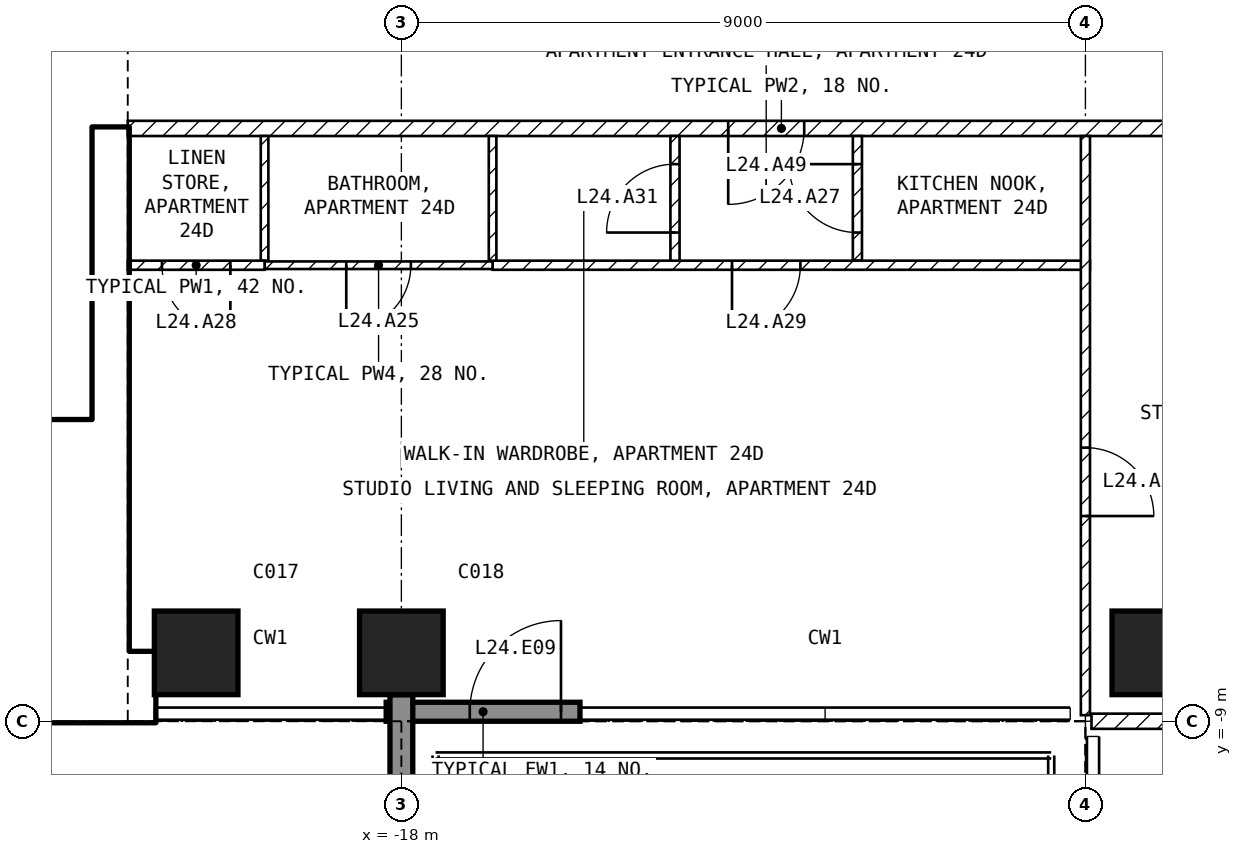
"""IFC4 building model, lengths in metres.
Left out: names, types, materials, properties, quantities, classifications, styles, units other than length and angle.
Written with IfcOpenShell. Run it as: python <this file> out.ifc"""

import sys

from ifc_helpers import new_model, si_unit, direction, frame, frame_2d, origin, origin_2d, place, context, subcontext, project, spatial, rectangle, extrude, element, fill, save


model = new_model("IFC4")
c1 = context("Model", 3, precision=1e-05, world=origin(), true_north=direction((0.0, 1.0)))
c2 = subcontext(c1, "Body", "Model", "MODEL_VIEW")
j1 = project(units=[si_unit("LENGTHUNIT", "METRE"), si_unit("PLANEANGLEUNIT", "RADIAN")], contexts=[c1])
p1 = place(None, origin())
s1 = spatial("IfcSite", under=j1, at=p1, CompositionType="ELEMENT")
p2 = place(p1, origin())
s2 = spatial("IfcBuilding", under=s1, at=p2, CompositionType="ELEMENT")
p3 = place(p2, frame((0.0, 0.0, 105.9)))
s3 = spatial("IfcBuildingStorey", under=s2, at=p3, CompositionType="ELEMENT", Elevation=105.9)
for number, where, z_axis, x_axis in (
    (1, (-20.7, -8.1, -0.25), (0.0, 0.0, 1.0), (1.0, 0.0, 0.0)),
    (2, (-18.0, -8.1, -0.25), (0.0, 0.0, 1.0), (1.0, 0.0, 0.0)),
    (3, (-8.1, -8.1, -0.25), (0.0, 0.0, 1.0), (1.0, 0.0, 0.0)),
):
    element("IfcColumn", number, at=place(p3, frame(where, z_axis=z_axis, x_axis=x_axis)), inside=s3, PredefinedType="COLUMN", context=c2, shape_type="SweptSolid", body=[
        extrude(rectangle(XDim=1.1, YDim=1.1, at=origin_2d()), origin(), (0.0, 0.0, 1.0), 3.5),
    ])
p4 = place(p3, frame((-18.2, -8.875, 0.0), z_axis=(0.0, 0.0, 1.0), x_axis=(1.0, 0.0, 0.0)))
e4 = element("IfcWall", 4, at=p4, inside=s3, PredefinedType="SOLIDWALL", context=c2, shape_type="SweptSolid", body=[
    extrude(rectangle(XDim=2.55, YDim=0.25, at=frame_2d((1.275, 0.0))), origin(), (0.0, 0.0, 1.0), 3.25),
])
p5 = place(p4, frame((1.1, 0.0, 0.0)))
e5 = element("IfcOpeningElement", 5, at=p5, cuts=e4, PredefinedType="OPENING", context=c2, shape_type="SweptSolid", body=[
    extrude(rectangle(XDim=1.2, YDim=2.4, at=frame_2d((0.6, 1.2))), frame((0.0, 0.135, 0.0), z_axis=(0.0, -1.0, 0.0), x_axis=(1.0, 0.0, 0.0)), (0.0, 0.0, 1.0), 0.27),
])
p6 = place(p3, frame((-18.0, -8.65, 0.0), z_axis=(0.0, 0.0, 1.0), x_axis=(0.0, -1.0, 0.0)))
e6 = element("IfcWall", 6, at=p6, inside=s3, PredefinedType="SOLIDWALL", context=c2, shape_type="SweptSolid", body=[
    extrude(rectangle(XDim=3.09, YDim=0.3, at=frame_2d((1.545, 0.0))), origin(), (0.0, 0.0, 1.0), 3.25),
])
p7 = place(p3, frame((-30.2, -8.55, 0.0), z_axis=(0.0, 0.0, 1.0), x_axis=(1.0, 0.0, 0.0)))
e7 = element("IfcWall", 7, at=p7, inside=s3, PredefinedType="SHEAR", context=c2, shape_type="SweptSolid", body=[
    extrude(rectangle(XDim=8.95, YDim=0.9, at=frame_2d((4.475, 0.0))), origin(), (0.0, 0.0, 1.0), 3.25),
])
p8 = place(p3, frame((-21.825, -8.1, 0.0), z_axis=(0.0, 0.0, 1.0), x_axis=(0.0, 1.0, 0.0)))
e8 = element("IfcWall", 8, at=p8, inside=s3, PredefinedType="SHEAR", context=c2, shape_type="SweptSolid", body=[
    extrude(rectangle(XDim=6.9, YDim=0.45, at=frame_2d((3.45, 0.0))), origin(), (0.0, 0.0, 1.0), 3.25),
])
p9 = place(p3, frame((-28.35, -5.15, 0.0), z_axis=(0.0, 0.0, 1.0), x_axis=(1.0, 0.0, 0.0)))
e9 = element("IfcWall", 9, at=p9, inside=s3, PredefinedType="SOLIDWALL", context=c2, shape_type="SweptSolid", body=[
    extrude(rectangle(XDim=6.3, YDim=0.2, at=frame_2d((3.15, 0.0))), origin(), (0.0, 0.0, 1.0), 3.25),
])
p10 = place(p9, frame((5.1, 0.0, 0.0)))
e10 = element("IfcOpeningElement", 10, at=p10, cuts=e9, PredefinedType="OPENING", context=c2, shape_type="SweptSolid", body=[
    extrude(rectangle(XDim=1.0, YDim=2.1, at=frame_2d((0.5, 1.05))), frame((0.0, 0.11, 0.0), z_axis=(0.0, -1.0, 0.0), x_axis=(1.0, 0.0, 0.0)), (0.0, 0.0, 1.0), 0.22),
])
p11 = place(p3, frame((-4.4, -1.2, 0.0), z_axis=(0.0, 0.0, 1.0), x_axis=(-1.0, 0.0, 0.0)))
e11 = element("IfcWall", 11, at=p11, inside=s3, PredefinedType="PARTITIONING", context=c2, shape_type="SweptSolid", body=[
    extrude(rectangle(XDim=17.2, YDim=0.2, at=frame_2d((8.6, 0.0))), origin(), (0.0, 0.0, 1.0), 3.25),
])
p12 = place(p11, frame((8.3, 0.0, 0.0)))
e12 = element("IfcOpeningElement", 12, at=p12, cuts=e11, PredefinedType="OPENING", context=c2, shape_type="SweptSolid", body=[
    extrude(rectangle(XDim=1.0, YDim=2.1, at=frame_2d((0.5, 1.05))), frame((0.0, 0.11, 0.0), z_axis=(0.0, -1.0, 0.0), x_axis=(1.0, 0.0, 0.0)), (0.0, 0.0, 1.0), 0.22),
])
p13 = place(p3, frame((8.92, -9.0, 0.0), z_axis=(0.0, 0.0, 1.0), x_axis=(-1.0, 0.0, 0.0)))
e13 = element("IfcWall", 13, at=p13, inside=s3, PredefinedType="PARTITIONING", context=c2, shape_type="SweptSolid", body=[
    extrude(rectangle(XDim=17.84, YDim=0.2, at=frame_2d((8.92, 0.0))), origin(), (0.0, 0.0, 1.0), 3.25),
])
p14 = place(p13, frame((8.42, 0.0, 0.0)))
e14 = element("IfcOpeningElement", 14, at=p14, cuts=e13, PredefinedType="OPENING", context=c2, shape_type="SweptSolid", body=[
    extrude(rectangle(XDim=1.0, YDim=2.1, at=frame_2d((0.5, 1.05))), frame((0.0, 0.11, 0.0), z_axis=(0.0, -1.0, 0.0), x_axis=(1.0, 0.0, 0.0)), (0.0, 0.0, 1.0), 0.22),
])
p15 = place(p3, frame((-12.0, -2.94, 0.0), z_axis=(0.0, 0.0, 1.0), x_axis=(0.0, 1.0, 0.0)))
e15 = element("IfcWall", 15, at=p15, inside=s3, PredefinedType="PARTITIONING", context=c2, shape_type="SweptSolid", body=[
    extrude(rectangle(XDim=1.64, YDim=0.12, at=frame_2d((0.82, 0.0))), origin(), (0.0, 0.0, 1.0), 3.25),
])
p16 = place(p15, frame((0.37, 0.0, 0.0)))
e16 = element("IfcOpeningElement", 16, at=p16, cuts=e15, PredefinedType="OPENING", context=c2, shape_type="SweptSolid", body=[
    extrude(rectangle(XDim=0.9, YDim=2.1, at=frame_2d((0.45, 1.05))), frame((0.0, 0.07, 0.0), z_axis=(0.0, -1.0, 0.0), x_axis=(1.0, 0.0, 0.0)), (0.0, 0.0, 1.0), 0.14),
])
p17 = place(p3, frame((-8.94, -3.0, 0.0), z_axis=(0.0, 0.0, 1.0), x_axis=(-1.0, 0.0, 0.0)))
e17 = element("IfcWall", 17, at=p17, inside=s3, PredefinedType="PARTITIONING", context=c2, shape_type="SweptSolid", body=[
    extrude(rectangle(XDim=7.86, YDim=0.12, at=frame_2d((3.93, 0.0))), origin(), (0.0, 0.0, 1.0), 3.25),
])
p18 = place(p17, frame((3.81, 0.0, 0.0)))
e18 = element("IfcOpeningElement", 18, at=p18, cuts=e17, PredefinedType="OPENING", context=c2, shape_type="SweptSolid", body=[
    extrude(rectangle(XDim=0.9, YDim=2.1, at=frame_2d((0.45, 1.05))), frame((0.0, 0.07, 0.0), z_axis=(0.0, -1.0, 0.0), x_axis=(1.0, 0.0, 0.0)), (0.0, 0.0, 1.0), 0.14),
])
p19 = place(p3, frame((-9.0, -1.3, 0.0), z_axis=(0.0, 0.0, 1.0), x_axis=(0.0, -1.0, 0.0)))
e19 = element("IfcWall", 19, at=p19, inside=s3, PredefinedType="PARTITIONING", context=c2, shape_type="SweptSolid", body=[
    extrude(rectangle(XDim=7.62, YDim=0.12, at=frame_2d((3.81, 0.0))), origin(), (0.0, 0.0, 1.0), 3.25),
])
p20 = place(p19, frame((4.1, 0.0, 0.0)))
e20 = element("IfcOpeningElement", 20, at=p20, cuts=e19, PredefinedType="OPENING", context=c2, shape_type="SweptSolid", body=[
    extrude(rectangle(XDim=0.9, YDim=2.1, at=frame_2d((0.45, 1.05))), frame((0.0, 0.07, 0.0), z_axis=(0.0, -1.0, 0.0), x_axis=(1.0, 0.0, 0.0)), (0.0, 0.0, 1.0), 0.14),
])
p21 = place(p3, frame((-14.4, -2.94, 0.0), z_axis=(0.0, 0.0, 1.0), x_axis=(0.0, 1.0, 0.0)))
e21 = element("IfcWall", 21, at=p21, inside=s3, PredefinedType="PARTITIONING", context=c2, shape_type="SweptSolid", body=[
    extrude(rectangle(XDim=1.64, YDim=0.12, at=frame_2d((0.82, 0.0))), origin(), (0.0, 0.0, 1.0), 3.25),
])
p22 = place(p21, frame((0.37, 0.0, 0.0)))
e22 = element("IfcOpeningElement", 22, at=p22, cuts=e21, PredefinedType="OPENING", context=c2, shape_type="SweptSolid", body=[
    extrude(rectangle(XDim=0.9, YDim=2.1, at=frame_2d((0.45, 1.05))), frame((0.0, 0.07, 0.0), z_axis=(0.0, -1.0, 0.0), x_axis=(1.0, 0.0, 0.0)), (0.0, 0.0, 1.0), 0.14),
])
for number, where, z_axis, x_axis in (
    (23, (-16.8, -2.94, 0.0), (0.0, 0.0, 1.0), (0.0, 1.0, 0.0)),
    (24, (-19.8, -2.94, 0.0), (0.0, 0.0, 1.0), (0.0, 1.0, 0.0)),
):
    element("IfcWall", number, at=place(p3, frame(where, z_axis=z_axis, x_axis=x_axis)), inside=s3, PredefinedType="PARTITIONING", context=c2, shape_type="SweptSolid", body=[
        extrude(rectangle(XDim=1.64, YDim=0.1, at=frame_2d((0.82, 0.0))), origin(), (0.0, 0.0, 1.0), 3.25),
    ])
p23 = place(p3, frame((-16.8, -3.0, 0.0), z_axis=(0.0, 0.0, 1.0), x_axis=(-1.0, 0.0, 0.0)))
e25 = element("IfcWall", 25, at=p23, inside=s3, PredefinedType="PARTITIONING", context=c2, shape_type="SweptSolid", body=[
    extrude(rectangle(XDim=3.0, YDim=0.1, at=frame_2d((1.5, 0.0))), origin(), (0.0, 0.0, 1.0), 3.25),
])
p24 = place(p23, frame((1.075, 0.0, 0.0)))
e26 = element("IfcOpeningElement", 26, at=p24, cuts=e25, PredefinedType="OPENING", context=c2, shape_type="SweptSolid", body=[
    extrude(rectangle(XDim=0.85, YDim=2.1, at=frame_2d((0.425, 1.05))), frame((0.0, 0.06, 0.0), z_axis=(0.0, -1.0, 0.0), x_axis=(1.0, 0.0, 0.0)), (0.0, 0.0, 1.0), 0.12),
])
p25 = place(p3, frame((-19.8, -3.0, 0.0), z_axis=(0.0, 0.0, 1.0), x_axis=(-1.0, 0.0, 0.0)))
e27 = element("IfcWall", 27, at=p25, inside=s3, PredefinedType="PARTITIONING", context=c2, shape_type="SweptSolid", body=[
    extrude(rectangle(XDim=1.8, YDim=0.12, at=frame_2d((0.9, 0.0))), origin(), (0.0, 0.0, 1.0), 3.25),
])
p26 = place(p25, frame((0.45, 0.0, 0.0)))
e28 = element("IfcOpeningElement", 28, at=p26, cuts=e27, PredefinedType="OPENING", context=c2, shape_type="SweptSolid", body=[
    extrude(rectangle(XDim=0.9, YDim=2.1, at=frame_2d((0.45, 1.05))), frame((0.0, 0.07, 0.0), z_axis=(0.0, -1.0, 0.0), x_axis=(1.0, 0.0, 0.0)), (0.0, 0.0, 1.0), 0.14),
])
p27 = place(p5, origin())
e29 = element("IfcDoor", 29, at=p27, inside=s3, OperationType="SINGLE_SWING_RIGHT", PredefinedType="DOOR", context=c2, shape_type="SweptSolid", body=[
    extrude(rectangle(XDim=1.2, YDim=2.4, at=frame_2d((0.6, 1.2))), frame((0.0, 0.025, 0.0), z_axis=(0.0, -1.0, 0.0), x_axis=(1.0, 0.0, 0.0)), (0.0, 0.0, 1.0), 0.05),
])
fill(e5, e29)
p28 = place(p10, origin())
e30 = element("IfcDoor", 30, at=p28, inside=s3, OperationType="SINGLE_SWING_LEFT", PredefinedType="DOOR", context=c2, shape_type="SweptSolid", body=[
    extrude(rectangle(XDim=1.0, YDim=2.1, at=frame_2d((0.5, 1.05))), frame((0.0, 0.025, 0.0), z_axis=(0.0, -1.0, 0.0), x_axis=(1.0, 0.0, 0.0)), (0.0, 0.0, 1.0), 0.05),
])
fill(e10, e30)
p29 = place(p24, origin())
e31 = element("IfcDoor", 31, at=p29, inside=s3, OperationType="SINGLE_SWING_RIGHT", PredefinedType="DOOR", context=c2, shape_type="SweptSolid", body=[
    extrude(rectangle(XDim=0.85, YDim=2.1, at=frame_2d((0.425, 1.05))), frame((0.0, 0.025, 0.0), z_axis=(0.0, -1.0, 0.0), x_axis=(1.0, 0.0, 0.0)), (0.0, 0.0, 1.0), 0.05),
])
fill(e26, e31)
p30 = place(p16, origin())
e32 = element("IfcDoor", 32, at=p30, inside=s3, OperationType="SINGLE_SWING_RIGHT", PredefinedType="DOOR", context=c2, shape_type="SweptSolid", body=[
    extrude(rectangle(XDim=0.9, YDim=2.1, at=frame_2d((0.45, 1.05))), frame((0.0, 0.025, 0.0), z_axis=(0.0, -1.0, 0.0), x_axis=(1.0, 0.0, 0.0)), (0.0, 0.0, 1.0), 0.05),
])
fill(e16, e32)
p31 = place(p26, origin())
e33 = element("IfcDoor", 33, at=p31, inside=s3, OperationType="SINGLE_SWING_LEFT", PredefinedType="DOOR", context=c2, shape_type="SweptSolid", body=[
    extrude(rectangle(XDim=0.9, YDim=2.1, at=frame_2d((0.45, 1.05))), frame((0.0, 0.025, 0.0), z_axis=(0.0, -1.0, 0.0), x_axis=(1.0, 0.0, 0.0)), (0.0, 0.0, 1.0), 0.05),
])
fill(e28, e33)
p32 = place(p18, origin())
e34 = element("IfcDoor", 34, at=p32, inside=s3, OperationType="SINGLE_SWING_RIGHT", PredefinedType="DOOR", context=c2, shape_type="SweptSolid", body=[
    extrude(rectangle(XDim=0.9, YDim=2.1, at=frame_2d((0.45, 1.05))), frame((0.0, 0.025, 0.0), z_axis=(0.0, -1.0, 0.0), x_axis=(1.0, 0.0, 0.0)), (0.0, 0.0, 1.0), 0.05),
])
fill(e18, e34)
p33 = place(p20, origin())
e35 = element("IfcDoor", 35, at=p33, inside=s3, OperationType="SINGLE_SWING_RIGHT", PredefinedType="DOOR", context=c2, shape_type="SweptSolid", body=[
    extrude(rectangle(XDim=0.9, YDim=2.1, at=frame_2d((0.45, 1.05))), frame((0.0, 0.025, 0.0), z_axis=(0.0, -1.0, 0.0), x_axis=(1.0, 0.0, 0.0)), (0.0, 0.0, 1.0), 0.05),
])
fill(e20, e35)
p34 = place(p22, origin())
e36 = element("IfcDoor", 36, at=p34, inside=s3, OperationType="SINGLE_SWING_LEFT", PredefinedType="DOOR", context=c2, shape_type="SweptSolid", body=[
    extrude(rectangle(XDim=0.9, YDim=2.1, at=frame_2d((0.45, 1.05))), frame((0.0, 0.025, 0.0), z_axis=(0.0, -1.0, 0.0), x_axis=(1.0, 0.0, 0.0)), (0.0, 0.0, 1.0), 0.05),
])
fill(e22, e36)
p35 = place(p12, origin())
e37 = element("IfcDoor", 37, at=p35, inside=s3, OperationType="SINGLE_SWING_RIGHT", PredefinedType="DOOR", context=c2, shape_type="SweptSolid", body=[
    extrude(rectangle(XDim=1.0, YDim=2.1, at=frame_2d((0.5, 1.05))), frame((0.0, 0.025, 0.0), z_axis=(0.0, -1.0, 0.0), x_axis=(1.0, 0.0, 0.0)), (0.0, 0.0, 1.0), 0.05),
])
fill(e12, e37)
save(model, sys.argv[1])
